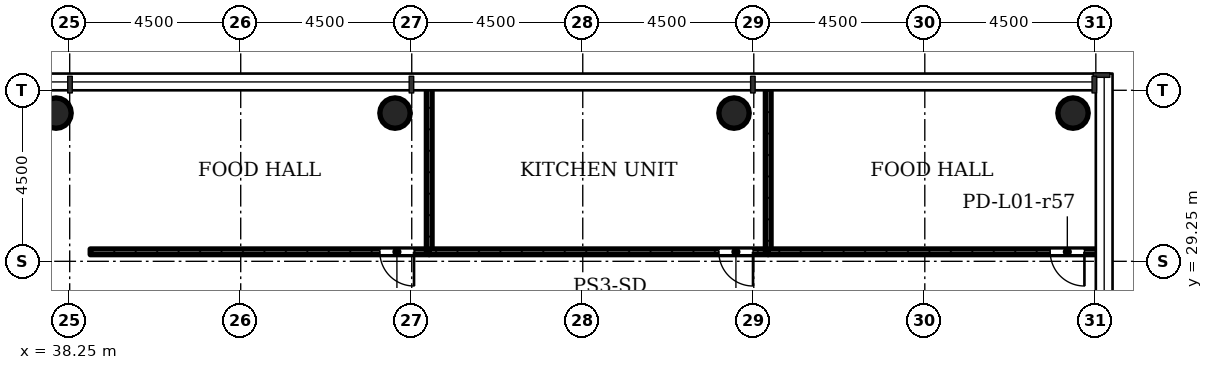
"""IFC4 building model, lengths in metres.
Left out: names, types, materials, properties, quantities, classifications, styles, units other than length and angle.
Written with IfcOpenShell. Run it as: python <this file> out.ifc"""

import sys

from ifc_helpers import new_model, si_unit, direction, frame, frame_2d, origin, origin_2d, place, context, subcontext, project, spatial, rectangle, hollow_circle, extrude, element, fill, save


model = new_model("IFC4")
c1 = context("Model", 3, precision=1e-05, world=origin(), true_north=direction((0.0, 1.0)))
c2 = subcontext(c1, "Body", "Model", "MODEL_VIEW")
j1 = project(units=[si_unit("LENGTHUNIT", "METRE"), si_unit("PLANEANGLEUNIT", "RADIAN")], contexts=[c1])
p1 = place(None, origin())
s1 = spatial("IfcSite", under=j1, at=p1, CompositionType="ELEMENT")
p2 = place(p1, origin())
s2 = spatial("IfcBuilding", under=s1, at=p2, CompositionType="ELEMENT")
p3 = place(p2, frame((0.0, 0.0, 6.0)))
s3 = spatial("IfcBuildingStorey", under=s2, at=p3, CompositionType="ELEMENT", Elevation=6.0)
for number, where, z_axis, x_axis in (
    (1, (37.89, 33.15, 0.0), (0.0, 0.0, 1.0), (1.0, 0.0, 0.0)),
    (2, (46.81, 33.15, 0.0), (0.0, 0.0, 1.0), (1.0, 0.0, 0.0)),
    (3, (55.73, 33.15, 0.0), (0.0, 0.0, 1.0), (1.0, 0.0, 0.0)),
    (4, (64.65, 33.15, 0.0), (0.0, 0.0, 1.0), (1.0, 0.0, 0.0)),
):
    element("IfcColumn", number, at=place(p3, frame(where, z_axis=z_axis, x_axis=x_axis)), inside=s3, PredefinedType="COLUMN", context=c2, shape_type="SweptSolid", body=[
        extrude(hollow_circle(Radius=0.4, WallThickness=0.028, at=origin_2d()), origin(), (0.0, 0.0, 1.0), 5.0),
    ])
p4 = place(p3, frame((47.71, 29.5, 0.0), z_axis=(0.0, 0.0, 1.0), x_axis=(-1.0, 0.0, 0.0)))
e5 = element("IfcWall", 5, at=p4, inside=s3, PredefinedType="PARTITIONING", context=c2, shape_type="SweptSolid", body=[
    extrude(rectangle(XDim=8.92, YDim=0.15, at=frame_2d((4.46, 0.0))), origin(), (0.0, 0.0, 1.0), 4.58),
])
p5 = place(p4, frame((0.4, 0.0, 0.0)))
e6 = element("IfcOpeningElement", 6, at=p5, cuts=e5, PredefinedType="OPENING", context=c2, shape_type="SweptSolid", body=[
    extrude(rectangle(XDim=0.9, YDim=2.1, at=frame_2d((0.45, 1.05))), frame((0.0, 0.085, 0.0), z_axis=(0.0, -1.0, 0.0), x_axis=(1.0, 0.0, 0.0)), (0.0, 0.0, 1.0), 0.17),
])
p6 = place(p3, frame((47.71, 33.85, 0.0), z_axis=(0.0, 0.0, 1.0), x_axis=(0.0, -1.0, 0.0)))
e7 = element("IfcWall", 7, at=p6, inside=s3, PredefinedType="PARTITIONING", context=c2, shape_type="SweptSolid", body=[
    extrude(rectangle(XDim=4.35, YDim=0.15, at=frame_2d((2.175, 0.0))), origin(), (0.0, 0.0, 1.0), 4.58),
])
p7 = place(p3, frame((56.63, 29.5, 0.0), z_axis=(0.0, 0.0, 1.0), x_axis=(-1.0, 0.0, 0.0)))
e8 = element("IfcWall", 8, at=p7, inside=s3, PredefinedType="PARTITIONING", context=c2, shape_type="SweptSolid", body=[
    extrude(rectangle(XDim=8.92, YDim=0.15, at=frame_2d((4.46, 0.0))), origin(), (0.0, 0.0, 1.0), 4.58),
])
p8 = place(p7, frame((0.4, 0.0, 0.0)))
e9 = element("IfcOpeningElement", 9, at=p8, cuts=e8, PredefinedType="OPENING", context=c2, shape_type="SweptSolid", body=[
    extrude(rectangle(XDim=0.9, YDim=2.1, at=frame_2d((0.45, 1.05))), frame((0.0, 0.085, 0.0), z_axis=(0.0, -1.0, 0.0), x_axis=(1.0, 0.0, 0.0)), (0.0, 0.0, 1.0), 0.17),
])
p9 = place(p3, frame((56.63, 33.85, 0.0), z_axis=(0.0, 0.0, 1.0), x_axis=(0.0, -1.0, 0.0)))
e10 = element("IfcWall", 10, at=p9, inside=s3, PredefinedType="PARTITIONING", context=c2, shape_type="SweptSolid", body=[
    extrude(rectangle(XDim=4.35, YDim=0.15, at=frame_2d((2.175, 0.0))), origin(), (0.0, 0.0, 1.0), 4.58),
])
p10 = place(p3, frame((65.35, 29.5, 0.0), z_axis=(0.0, 0.0, 1.0), x_axis=(-1.0, 0.0, 0.0)))
e11 = element("IfcWall", 11, at=p10, inside=s3, PredefinedType="PARTITIONING", context=c2, shape_type="SweptSolid", body=[
    extrude(rectangle(XDim=8.72, YDim=0.15, at=frame_2d((4.36, 0.0))), origin(), (0.0, 0.0, 1.0), 4.58),
])
p11 = place(p10, frame((0.4, 0.0, 0.0)))
e12 = element("IfcOpeningElement", 12, at=p11, cuts=e11, PredefinedType="OPENING", context=c2, shape_type="SweptSolid", body=[
    extrude(rectangle(XDim=0.9, YDim=2.1, at=frame_2d((0.45, 1.05))), frame((0.0, 0.085, 0.0), z_axis=(0.0, -1.0, 0.0), x_axis=(1.0, 0.0, 0.0)), (0.0, 0.0, 1.0), 0.17),
])
p12 = place(p5, origin())
e13 = element("IfcDoor", 13, at=p12, inside=s3, OperationType="SINGLE_SWING_RIGHT", PredefinedType="DOOR", context=c2, shape_type="SweptSolid", body=[
    extrude(rectangle(XDim=0.9, YDim=2.1, at=frame_2d((0.45, 1.05))), frame((0.0, 0.025, 0.0), z_axis=(0.0, -1.0, 0.0), x_axis=(1.0, 0.0, 0.0)), (0.0, 0.0, 1.0), 0.05),
])
fill(e6, e13)
p13 = place(p8, origin())
e14 = element("IfcDoor", 14, at=p13, inside=s3, OperationType="SINGLE_SWING_RIGHT", PredefinedType="DOOR", context=c2, shape_type="SweptSolid", body=[
    extrude(rectangle(XDim=0.9, YDim=2.1, at=frame_2d((0.45, 1.05))), frame((0.0, 0.025, 0.0), z_axis=(0.0, -1.0, 0.0), x_axis=(1.0, 0.0, 0.0)), (0.0, 0.0, 1.0), 0.05),
])
fill(e9, e14)
p14 = place(p11, origin())
e15 = element("IfcDoor", 15, at=p14, inside=s3, OperationType="SINGLE_SWING_RIGHT", PredefinedType="DOOR", context=c2, shape_type="SweptSolid", body=[
    extrude(rectangle(XDim=0.9, YDim=2.1, at=frame_2d((0.45, 1.05))), frame((0.0, 0.025, 0.0), z_axis=(0.0, -1.0, 0.0), x_axis=(1.0, 0.0, 0.0)), (0.0, 0.0, 1.0), 0.05),
])
fill(e12, e15)
save(model, sys.argv[1])
